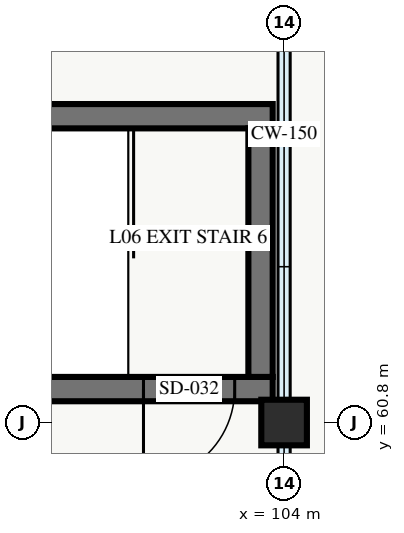
"""IFC4 building model, lengths in metres.
Left out: names, types, materials, properties, quantities, classifications, styles, units other than length and angle.
Written with IfcOpenShell. Run it as: python <this file> out.ifc"""

import sys

from ifc_helpers import new_model, si_unit, direction, frame, frame_2d, origin, origin_2d, place, context, subcontext, project, spatial, rectangle, extrude, element, fill, save


model = new_model("IFC4")
c1 = context("Model", 3, precision=1e-05, world=origin(), true_north=direction((0.0, 1.0)))
c2 = subcontext(c1, "Body", "Model", "MODEL_VIEW")
j1 = project(units=[si_unit("LENGTHUNIT", "METRE"), si_unit("PLANEANGLEUNIT", "RADIAN")], contexts=[c1])
p1 = place(None, origin())
s1 = spatial("IfcSite", under=j1, at=p1, CompositionType="ELEMENT")
p2 = place(p1, origin())
s2 = spatial("IfcBuilding", under=s1, at=p2, CompositionType="ELEMENT")
p3 = place(p2, frame((0.0, 0.0, 23.7)))
s3 = spatial("IfcBuildingStorey", under=s2, at=p3, CompositionType="ELEMENT", Elevation=23.7)
p4 = place(p3, frame((104.0, 60.8, 0.0), z_axis=(0.0, 0.0, 1.0), x_axis=(1.0, 0.0, 0.0)))
e1 = element("IfcColumn", 1, at=p4, inside=s3, PredefinedType="COLUMN", context=c2, shape_type="SweptSolid", body=[
    extrude(rectangle(XDim=0.6, YDim=0.6, at=origin_2d()), origin(), (0.0, 0.0, 1.0), 4.8),
])
p5 = place(p3, frame((103.85, 61.24, 0.0), z_axis=(0.0, 0.0, 1.0), x_axis=(-1.0, 0.0, 0.0)))
e2 = element("IfcWall", 2, at=p5, inside=s3, PredefinedType="SHEAR", context=c2, shape_type="SweptSolid", body=[
    extrude(rectangle(XDim=7.7, YDim=0.32, at=frame_2d((3.85, 0.0))), origin(), (0.0, 0.0, 1.0), 4.58),
])
p6 = place(p5, frame((0.5, 0.0, 0.0)))
e3 = element("IfcOpeningElement", 3, at=p6, cuts=e2, PredefinedType="OPENING", context=c2, shape_type="SweptSolid", body=[
    extrude(rectangle(XDim=1.2, YDim=2.2, at=frame_2d((0.6, 1.1))), frame((0.0, 0.17, 0.0), z_axis=(0.0, -1.0, 0.0), x_axis=(1.0, 0.0, 0.0)), (0.0, 0.0, 1.0), 0.34),
])
p7 = place(p3, frame((96.15, 64.83, 0.0), z_axis=(0.0, 0.0, 1.0), x_axis=(1.0, 0.0, 0.0)))
e4 = element("IfcWall", 4, at=p7, inside=s3, PredefinedType="SHEAR", context=c2, shape_type="SweptSolid", body=[
    extrude(rectangle(XDim=7.7, YDim=0.32, at=frame_2d((3.85, 0.0))), origin(), (0.0, 0.0, 1.0), 4.58),
])
p8 = place(p3, frame((103.69, 64.67, 0.0), z_axis=(0.0, 0.0, 1.0), x_axis=(0.0, -1.0, 0.0)))
e5 = element("IfcWall", 5, at=p8, inside=s3, PredefinedType="SHEAR", context=c2, shape_type="SweptSolid", body=[
    extrude(rectangle(XDim=3.27, YDim=0.32, at=frame_2d((1.635, 0.0))), origin(), (0.0, 0.0, 1.0), 4.58),
])
p9 = place(p6, origin())
e6 = element("IfcDoor", 6, at=p9, inside=s3, OperationType="SINGLE_SWING_RIGHT", PredefinedType="DOOR", context=c2, shape_type="SweptSolid", body=[
    extrude(rectangle(XDim=1.2, YDim=2.2, at=frame_2d((0.6, 1.1))), frame((0.0, 0.025, 0.0), z_axis=(0.0, -1.0, 0.0), x_axis=(1.0, 0.0, 0.0)), (0.0, 0.0, 1.0), 0.05),
])
fill(e3, e6)
save(model, sys.argv[1])
